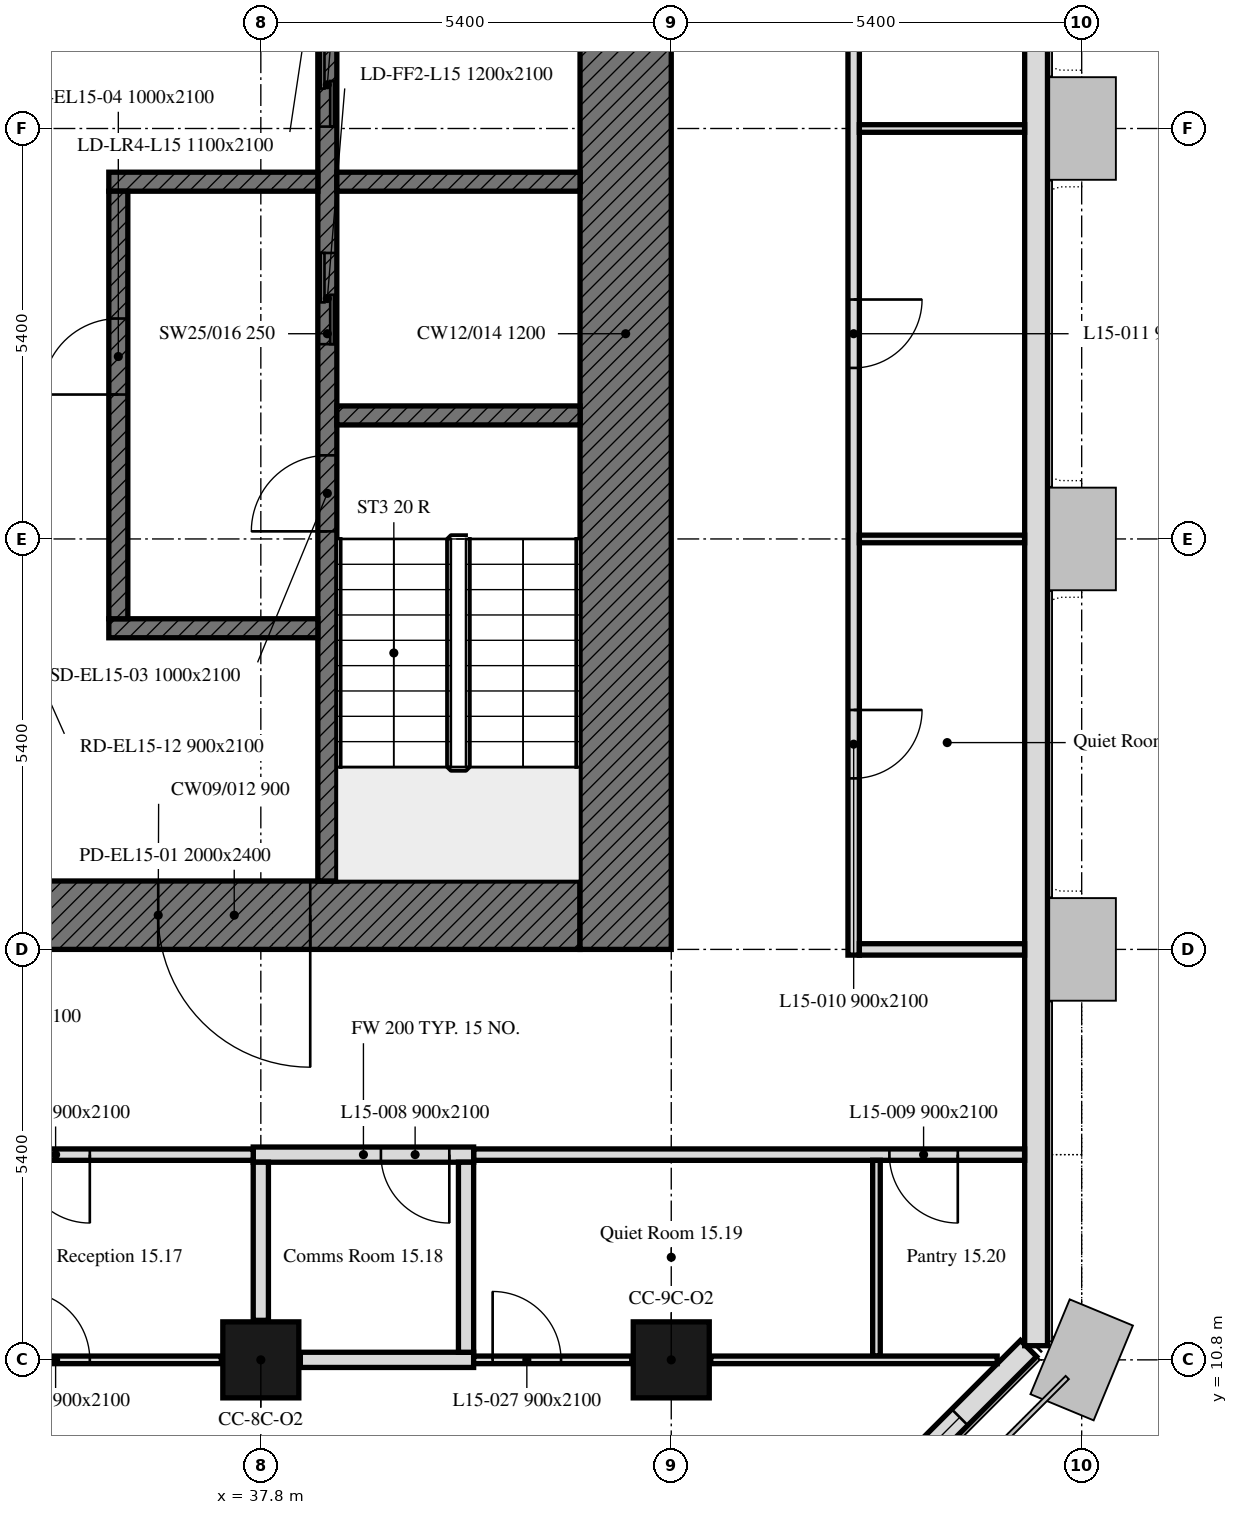
"""IFC4 building model, lengths in metres.
Left out: names, types, materials, properties, quantities, classifications, styles, units other than length and angle.
Written with IfcOpenShell. Run it as: python <this file> out.ifc"""

import sys

from ifc_helpers import new_model, si_unit, direction, frame, frame_2d, origin, origin_2d, place, context, subcontext, project, spatial, rectangle, extrude, element, fill, save


model = new_model("IFC4")
c1 = context("Model", 3, precision=1e-05, world=origin(), true_north=direction((0.0, 1.0)))
c2 = subcontext(c1, "Body", "Model", "MODEL_VIEW")
j1 = project(units=[si_unit("LENGTHUNIT", "METRE"), si_unit("PLANEANGLEUNIT", "RADIAN")], contexts=[c1])
p1 = place(None, origin())
s1 = spatial("IfcSite", under=j1, at=p1, CompositionType="ELEMENT")
p2 = place(p1, origin())
s2 = spatial("IfcBuilding", under=s1, at=p2, CompositionType="ELEMENT")
p3 = place(p2, frame((0.0, 0.0, 68.8)))
s3 = spatial("IfcBuildingStorey", under=s2, at=p3, CompositionType="ELEMENT", Elevation=68.8)
for number, where, z_axis, x_axis in (
    (1, (37.8, 10.8, 0.0), (0.0, 0.0, 1.0), (1.0, 0.0, 0.0)),
    (2, (43.2, 10.8, 0.0), (0.0, 0.0, 1.0), (1.0, 0.0, 0.0)),
):
    element("IfcColumn", number, at=place(p3, frame(where, z_axis=z_axis, x_axis=x_axis)), inside=s3, PredefinedType="COLUMN", context=c2, shape_type="SweptSolid", body=[
        extrude(rectangle(XDim=1.0, YDim=1.0, at=origin_2d()), origin(), (0.0, 0.0, 1.0), 3.5),
    ])
p4 = place(p3, frame((43.051, 6.099, 0.0), z_axis=(0.0, 0.0, 1.0), x_axis=(0.707106781187, 0.707106781187, 0.0)))
e3 = element("IfcWall", 3, at=p4, inside=s3, PredefinedType="SOLIDWALL", context=c2, shape_type="SweptSolid", body=[
    extrude(rectangle(XDim=6.86, YDim=0.3, at=frame_2d((3.43, 0.0))), origin(), (0.0, 0.0, 1.0), 3.5),
])
p5 = place(p4, frame((1.28, 0.0, 0.9)))
e4 = element("IfcOpeningElement", 4, at=p5, cuts=e3, PredefinedType="OPENING", context=c2, shape_type="SweptSolid", body=[
    extrude(rectangle(XDim=1.1, YDim=1.7, at=frame_2d((0.55, 0.85))), frame((0.0, 0.16, 0.0), z_axis=(0.0, -1.0, 0.0), x_axis=(1.0, 0.0, 0.0)), (0.0, 0.0, 1.0), 0.32),
])
p6 = place(p4, frame((4.48, 0.0, 0.9)))
e5 = element("IfcOpeningElement", 5, at=p6, cuts=e3, PredefinedType="OPENING", context=c2, shape_type="SweptSolid", body=[
    extrude(rectangle(XDim=1.1, YDim=1.7, at=frame_2d((0.55, 0.85))), frame((0.0, 0.16, 0.0), z_axis=(0.0, -1.0, 0.0), x_axis=(1.0, 0.0, 0.0)), (0.0, 0.0, 1.0), 0.32),
])
p7 = place(p3, frame((48.0, 10.986, 0.0), z_axis=(0.0, 0.0, 1.0), x_axis=(0.0, 1.0, 0.0)))
e6 = element("IfcWall", 6, at=p7, inside=s3, PredefinedType="SOLIDWALL", context=c2, shape_type="SweptSolid", body=[
    extrude(rectangle(XDim=32.027, YDim=0.3, at=frame_2d((16.014, 0.0))), origin(), (0.0, 0.0, 1.0), 3.5),
])
p8 = place(p7, frame((27.814, 0.0, 0.9)))
e7 = element("IfcOpeningElement", 7, at=p8, cuts=e6, PredefinedType="OPENING", context=c2, shape_type="SweptSolid", body=[
    extrude(rectangle(XDim=3.4, YDim=1.7, at=frame_2d((1.7, 0.85))), frame((0.0, 0.16, 0.0), z_axis=(0.0, -1.0, 0.0), x_axis=(1.0, 0.0, 0.0)), (0.0, 0.0, 1.0), 0.32),
])
p9 = place(p3, frame((42.0, 16.65, 0.0), z_axis=(0.0, 0.0, 1.0), x_axis=(-1.0, 0.0, 0.0)))
e8 = element("IfcWall", 8, at=p9, inside=s3, PredefinedType="SOLIDWALL", context=c2, shape_type="SweptSolid", body=[
    extrude(rectangle(XDim=11.1, YDim=0.9, at=frame_2d((5.55, 0.0))), origin(), (0.0, 0.0, 1.0), 3.5),
])
p10 = place(p9, frame((3.55, 0.0, 0.0)))
e9 = element("IfcOpeningElement", 9, at=p10, cuts=e8, PredefinedType="OPENING", context=c2, shape_type="SweptSolid", body=[
    extrude(rectangle(XDim=2.0, YDim=2.4, at=frame_2d((1.0, 1.2))), frame((0.0, 0.45, 0.0), z_axis=(0.0, -1.0, 0.0), x_axis=(1.0, 0.0, 0.0)), (0.0, 0.0, 1.0), 0.9),
])
p11 = place(p3, frame((42.6, 32.4, 0.0), z_axis=(0.0, 0.0, 1.0), x_axis=(0.0, -1.0, 0.0)))
e10 = element("IfcWall", 10, at=p11, inside=s3, PredefinedType="SOLIDWALL", context=c2, shape_type="SweptSolid", body=[
    extrude(rectangle(XDim=16.2, YDim=1.2, at=frame_2d((8.1, 0.0))), origin(), (0.0, 0.0, 1.0), 3.5),
])
p12 = place(p3, frame((38.675, 17.1, 0.0), z_axis=(0.0, 0.0, 1.0), x_axis=(0.0, 1.0, 0.0)))
e11 = element("IfcWall", 11, at=p12, inside=s3, PredefinedType="SOLIDWALL", context=c2, shape_type="SweptSolid", body=[
    extrude(rectangle(XDim=14.4, YDim=0.25, at=frame_2d((7.2, 0.0))), origin(), (0.0, 0.0, 1.0), 3.5),
])
p13 = place(p12, frame((4.6, 0.0, 0.0)))
e12 = element("IfcOpeningElement", 12, at=p13, cuts=e11, PredefinedType="OPENING", context=c2, shape_type="SweptSolid", body=[
    extrude(rectangle(XDim=1.0, YDim=2.1, at=frame_2d((0.5, 1.05))), frame((0.0, 0.125, 0.0), z_axis=(0.0, -1.0, 0.0), x_axis=(1.0, 0.0, 0.0)), (0.0, 0.0, 1.0), 0.25),
])
p14 = place(p12, frame((7.062, 0.0, 0.0)))
e13 = element("IfcOpeningElement", 13, at=p14, cuts=e11, PredefinedType="OPENING", context=c2, shape_type="SweptSolid", body=[
    extrude(rectangle(XDim=1.2, YDim=2.1, at=frame_2d((0.6, 1.05))), frame((0.0, 0.125, 0.0), z_axis=(0.0, -1.0, 0.0), x_axis=(1.0, 0.0, 0.0)), (0.0, 0.0, 1.0), 0.25),
])
p15 = place(p12, frame((9.925, 0.0, 0.0)))
e14 = element("IfcOpeningElement", 14, at=p15, cuts=e11, PredefinedType="OPENING", context=c2, shape_type="SweptSolid", body=[
    extrude(rectangle(XDim=1.1, YDim=2.1, at=frame_2d((0.55, 1.05))), frame((0.0, 0.125, 0.0), z_axis=(0.0, -1.0, 0.0), x_axis=(1.0, 0.0, 0.0)), (0.0, 0.0, 1.0), 0.25),
])
p16 = place(p12, frame((12.587, 0.0, 0.0)))
e15 = element("IfcOpeningElement", 15, at=p16, cuts=e11, PredefinedType="OPENING", context=c2, shape_type="SweptSolid", body=[
    extrude(rectangle(XDim=1.1, YDim=2.1, at=frame_2d((0.55, 1.05))), frame((0.0, 0.125, 0.0), z_axis=(0.0, -1.0, 0.0), x_axis=(1.0, 0.0, 0.0)), (0.0, 0.0, 1.0), 0.25),
])
for number, where, z_axis, x_axis in (
    (16, (38.8, 23.225, 0.0), (0.0, 0.0, 1.0), (1.0, 0.0, 0.0)),
    (17, (38.8, 26.3, 0.0), (0.0, 0.0, 1.0), (1.0, 0.0, 0.0)),
):
    element("IfcWall", number, at=place(p3, frame(where, z_axis=z_axis, x_axis=x_axis)), inside=s3, PredefinedType="SOLIDWALL", context=c2, shape_type="SweptSolid", body=[
        extrude(rectangle(XDim=3.2, YDim=0.25, at=frame_2d((1.6, 0.0))), origin(), (0.0, 0.0, 1.0), 3.5),
    ])
for number, where, z_axis, x_axis in (
    (18, (35.8, 26.3, 0.0), (0.0, 0.0, 1.0), (1.0, 0.0, 0.0)),
    (19, (35.8, 20.425, 0.0), (0.0, 0.0, 1.0), (1.0, 0.0, 0.0)),
):
    element("IfcWall", number, at=place(p3, frame(where, z_axis=z_axis, x_axis=x_axis)), inside=s3, PredefinedType="SOLIDWALL", context=c2, shape_type="SweptSolid", body=[
        extrude(rectangle(XDim=2.75, YDim=0.25, at=frame_2d((1.375, 0.0))), origin(), (0.0, 0.0, 1.0), 3.5),
    ])
p17 = place(p3, frame((35.925, 20.55, 0.0), z_axis=(0.0, 0.0, 1.0), x_axis=(0.0, 1.0, 0.0)))
e20 = element("IfcWall", 20, at=p17, inside=s3, PredefinedType="SOLIDWALL", context=c2, shape_type="SweptSolid", body=[
    extrude(rectangle(XDim=5.625, YDim=0.25, at=frame_2d((2.812, 0.0))), origin(), (0.0, 0.0, 1.0), 3.5),
])
p18 = place(p17, frame((2.95, 0.0, 0.0)))
e21 = element("IfcOpeningElement", 21, at=p18, cuts=e20, PredefinedType="OPENING", context=c2, shape_type="SweptSolid", body=[
    extrude(rectangle(XDim=1.0, YDim=2.1, at=frame_2d((0.5, 1.05))), frame((0.0, 0.125, 0.0), z_axis=(0.0, -1.0, 0.0), x_axis=(1.0, 0.0, 0.0)), (0.0, 0.0, 1.0), 0.25),
])
p19 = place(p3, frame((45.6, 32.325, 0.0), z_axis=(0.0, 0.0, 1.0), x_axis=(0.0, -1.0, 0.0)))
e22 = element("IfcWall", 22, at=p19, inside=s3, PredefinedType="PARTITIONING", context=c2, shape_type="SweptSolid", body=[
    extrude(rectangle(XDim=16.2, YDim=0.15, at=frame_2d((8.1, 0.0))), origin(), (0.0, 0.0, 1.0), 2.75),
])
p20 = place(p19, frame((12.975, 0.0, 0.0)))
e23 = element("IfcOpeningElement", 23, at=p20, cuts=e22, PredefinedType="OPENING", context=c2, shape_type="SweptSolid", body=[
    extrude(rectangle(XDim=0.9, YDim=2.1, at=frame_2d((0.45, 1.05))), frame((0.0, 0.075, 0.0), z_axis=(0.0, -1.0, 0.0), x_axis=(1.0, 0.0, 0.0)), (0.0, 0.0, 1.0), 0.15),
])
p21 = place(p19, frame((7.575, 0.0, 0.0)))
e24 = element("IfcOpeningElement", 24, at=p21, cuts=e22, PredefinedType="OPENING", context=c2, shape_type="SweptSolid", body=[
    extrude(rectangle(XDim=0.9, YDim=2.1, at=frame_2d((0.45, 1.05))), frame((0.0, 0.075, 0.0), z_axis=(0.0, -1.0, 0.0), x_axis=(1.0, 0.0, 0.0)), (0.0, 0.0, 1.0), 0.15),
])
p22 = place(p19, frame((2.175, 0.0, 0.0)))
e25 = element("IfcOpeningElement", 25, at=p22, cuts=e22, PredefinedType="OPENING", context=c2, shape_type="SweptSolid", body=[
    extrude(rectangle(XDim=0.9, YDim=2.1, at=frame_2d((0.45, 1.05))), frame((0.0, 0.075, 0.0), z_axis=(0.0, -1.0, 0.0), x_axis=(1.0, 0.0, 0.0)), (0.0, 0.0, 1.0), 0.15),
])
p23 = place(p3, frame((45.675, 16.2, 0.0), z_axis=(0.0, 0.0, 1.0), x_axis=(1.0, 0.0, 0.0)))
e26 = element("IfcWall", 26, at=p23, inside=s3, PredefinedType="PARTITIONING", context=c2, shape_type="SweptSolid", body=[
    extrude(rectangle(XDim=2.174, YDim=0.15, at=frame_2d((1.087, 0.0))), origin(), (0.0, 0.0, 1.0), 2.75),
])
p24 = place(p3, frame((47.849, 13.5, 0.0), z_axis=(0.0, 0.0, 1.0), x_axis=(-1.0, 0.0, 0.0)))
e27 = element("IfcWall", 27, at=p24, inside=s3, PredefinedType="PARTITIONING", context=c2, shape_type="SweptSolid", body=[
    extrude(rectangle(XDim=7.249, YDim=0.15, at=frame_2d((3.625, 0.0))), origin(), (0.0, 0.0, 1.0), 3.5),
])
p25 = place(p24, frame((0.879, 0.0, 0.0)))
e28 = element("IfcOpeningElement", 28, at=p25, cuts=e27, PredefinedType="OPENING", context=c2, shape_type="SweptSolid", body=[
    extrude(rectangle(XDim=0.9, YDim=2.1, at=frame_2d((0.45, 1.05))), frame((0.0, 0.075, 0.0), z_axis=(0.0, -1.0, 0.0), x_axis=(1.0, 0.0, 0.0)), (0.0, 0.0, 1.0), 0.15),
])
p26 = place(p3, frame((40.6, 13.5, 0.0), z_axis=(0.0, 0.0, 1.0), x_axis=(-1.0, 0.0, 0.0)))
e29 = element("IfcWall", 29, at=p26, inside=s3, PredefinedType="PARTITIONING", context=c2, shape_type="SweptSolid", body=[
    extrude(rectangle(XDim=2.9, YDim=0.2, at=frame_2d((1.45, 0.0))), origin(), (0.0, 0.0, 1.0), 3.5),
])
p27 = place(p26, frame((0.32, 0.0, 0.0)))
e30 = element("IfcOpeningElement", 30, at=p27, cuts=e29, PredefinedType="OPENING", context=c2, shape_type="SweptSolid", body=[
    extrude(rectangle(XDim=0.9, YDim=2.1, at=frame_2d((0.45, 1.05))), frame((0.0, 0.1, 0.0), z_axis=(0.0, -1.0, 0.0), x_axis=(1.0, 0.0, 0.0)), (0.0, 0.0, 1.0), 0.2),
])
p28 = place(p3, frame((37.7, 13.5, 0.0), z_axis=(0.0, 0.0, 1.0), x_axis=(-1.0, 0.0, 0.0)))
e31 = element("IfcWall", 31, at=p28, inside=s3, PredefinedType="PARTITIONING", context=c2, shape_type="SweptSolid", body=[
    extrude(rectangle(XDim=13.3, YDim=0.15, at=frame_2d((6.65, 0.0))), origin(), (0.0, 0.0, 1.0), 3.5),
])
p29 = place(p28, frame((2.15, 0.0, 0.0)))
e32 = element("IfcOpeningElement", 32, at=p29, cuts=e31, PredefinedType="OPENING", context=c2, shape_type="SweptSolid", body=[
    extrude(rectangle(XDim=0.9, YDim=2.1, at=frame_2d((0.45, 1.05))), frame((0.0, 0.075, 0.0), z_axis=(0.0, -1.0, 0.0), x_axis=(1.0, 0.0, 0.0)), (0.0, 0.0, 1.0), 0.15),
])
p30 = place(p28, frame((8.17, 0.0, 0.0)))
e33 = element("IfcOpeningElement", 33, at=p30, cuts=e31, PredefinedType="OPENING", context=c2, shape_type="SweptSolid", body=[
    extrude(rectangle(XDim=0.9, YDim=2.1, at=frame_2d((0.45, 1.05))), frame((0.0, 0.075, 0.0), z_axis=(0.0, -1.0, 0.0), x_axis=(1.0, 0.0, 0.0)), (0.0, 0.0, 1.0), 0.15),
])
p31 = place(p3, frame((32.92, 10.8, 0.0), z_axis=(0.0, 0.0, 1.0), x_axis=(1.0, 0.0, 0.0)))
e34 = element("IfcWall", 34, at=p31, inside=s3, PredefinedType="PARTITIONING", context=c2, shape_type="SweptSolid", body=[
    extrude(rectangle(XDim=4.36, YDim=0.1, at=frame_2d((2.18, 0.0))), origin(), (0.0, 0.0, 1.0), 3.5),
])
p32 = place(p31, frame((1.73, 0.0, 0.0)))
e35 = element("IfcOpeningElement", 35, at=p32, cuts=e34, PredefinedType="OPENING", context=c2, shape_type="SweptSolid", body=[
    extrude(rectangle(XDim=0.9, YDim=2.1, at=frame_2d((0.45, 1.05))), frame((0.0, 0.05, 0.0), z_axis=(0.0, -1.0, 0.0), x_axis=(1.0, 0.0, 0.0)), (0.0, 0.0, 1.0), 0.1),
])
p33 = place(p3, frame((37.8, 11.32, 0.0), z_axis=(0.0, 0.0, 1.0), x_axis=(0.0, 1.0, 0.0)))
e36 = element("IfcWall", 36, at=p33, inside=s3, PredefinedType="PARTITIONING", context=c2, shape_type="SweptSolid", body=[
    extrude(rectangle(XDim=2.08, YDim=0.2, at=frame_2d((1.04, 0.0))), origin(), (0.0, 0.0, 1.0), 3.5),
])
p34 = place(p3, frame((38.32, 10.8, 0.0), z_axis=(0.0, 0.0, 1.0), x_axis=(1.0, 0.0, 0.0)))
e37 = element("IfcWall", 37, at=p34, inside=s3, PredefinedType="PARTITIONING", context=c2, shape_type="SweptSolid", body=[
    extrude(rectangle(XDim=2.28, YDim=0.2, at=frame_2d((1.14, 0.0))), origin(), (0.0, 0.0, 1.0), 3.5),
])
p35 = place(p3, frame((40.5, 10.9, 0.0), z_axis=(0.0, 0.0, 1.0), x_axis=(0.0, 1.0, 0.0)))
e38 = element("IfcWall", 38, at=p35, inside=s3, PredefinedType="PARTITIONING", context=c2, shape_type="SweptSolid", body=[
    extrude(rectangle(XDim=2.5, YDim=0.2, at=frame_2d((1.25, 0.0))), origin(), (0.0, 0.0, 1.0), 3.5),
])
p36 = place(p3, frame((40.6, 10.8, 0.0), z_axis=(0.0, 0.0, 1.0), x_axis=(1.0, 0.0, 0.0)))
e39 = element("IfcWall", 39, at=p36, inside=s3, PredefinedType="PARTITIONING", context=c2, shape_type="SweptSolid", body=[
    extrude(rectangle(XDim=2.08, YDim=0.1, at=frame_2d((1.04, 0.0))), origin(), (0.0, 0.0, 1.0), 3.5),
])
p37 = place(p36, frame((0.25, 0.0, 0.0)))
e40 = element("IfcOpeningElement", 40, at=p37, cuts=e39, PredefinedType="OPENING", context=c2, shape_type="SweptSolid", body=[
    extrude(rectangle(XDim=0.9, YDim=2.1, at=frame_2d((0.45, 1.05))), frame((0.0, 0.05, 0.0), z_axis=(0.0, -1.0, 0.0), x_axis=(1.0, 0.0, 0.0)), (0.0, 0.0, 1.0), 0.1),
])
p38 = place(p3, frame((45.9, 10.85, 0.0), z_axis=(0.0, 0.0, 1.0), x_axis=(0.0, 1.0, 0.0)))
e41 = element("IfcWall", 41, at=p38, inside=s3, PredefinedType="PARTITIONING", context=c2, shape_type="SweptSolid", body=[
    extrude(rectangle(XDim=2.575, YDim=0.1, at=frame_2d((1.288, 0.0))), origin(), (0.0, 0.0, 1.0), 3.5),
])
p39 = place(p3, frame((43.72, 10.8, 0.0), z_axis=(0.0, 0.0, 1.0), x_axis=(1.0, 0.0, 0.0)))
e42 = element("IfcWall", 42, at=p39, inside=s3, PredefinedType="PARTITIONING", context=c2, shape_type="SweptSolid", body=[
    extrude(rectangle(XDim=3.768, YDim=0.1, at=frame_2d((1.884, 0.0))), origin(), (0.0, 0.0, 1.0), 3.5),
])
for number, where, z_axis, x_axis in (
    (43, (45.675, 21.6, 0.0), (0.0, 0.0, 1.0), (1.0, 0.0, 0.0)),
    (44, (45.675, 27.0, 0.0), (0.0, 0.0, 1.0), (1.0, 0.0, 0.0)),
):
    element("IfcWall", number, at=place(p3, frame(where, z_axis=z_axis, x_axis=x_axis)), inside=s3, PredefinedType="PARTITIONING", context=c2, shape_type="SweptSolid", body=[
        extrude(rectangle(XDim=2.174, YDim=0.1, at=frame_2d((1.087, 0.0))), origin(), (0.0, 0.0, 1.0), 2.75),
    ])
p40 = place(p6, origin())
e45 = element("IfcWindow", 45, at=p40, inside=s3, PartitioningType="SINGLE_PANEL", PredefinedType="WINDOW", context=c2, shape_type="SweptSolid", body=[
    extrude(rectangle(XDim=1.1, YDim=1.7, at=frame_2d((0.55, 0.85))), frame((0.0, 0.03, 0.0), z_axis=(0.0, -1.0, 0.0), x_axis=(1.0, 0.0, 0.0)), (0.0, 0.0, 1.0), 0.06),
])
fill(e5, e45)
p41 = place(p10, origin())
e46 = element("IfcDoor", 46, at=p41, inside=s3, OperationType="DOUBLE_DOOR_SINGLE_SWING", PredefinedType="DOOR", context=c2, shape_type="SweptSolid", body=[
    extrude(rectangle(XDim=2.0, YDim=2.4, at=frame_2d((1.0, 1.2))), frame((0.0, 0.025, 0.0), z_axis=(0.0, -1.0, 0.0), x_axis=(1.0, 0.0, 0.0)), (0.0, 0.0, 1.0), 0.05),
])
fill(e9, e46)
p42 = place(p13, origin())
e47 = element("IfcDoor", 47, at=p42, inside=s3, OperationType="SINGLE_SWING_LEFT", PredefinedType="DOOR", context=c2, shape_type="SweptSolid", body=[
    extrude(rectangle(XDim=1.0, YDim=2.1, at=frame_2d((0.5, 1.05))), frame((0.0, 0.025, 0.0), z_axis=(0.0, -1.0, 0.0), x_axis=(1.0, 0.0, 0.0)), (0.0, 0.0, 1.0), 0.05),
])
fill(e12, e47)
p43 = place(p18, origin())
e48 = element("IfcDoor", 48, at=p43, inside=s3, OperationType="SINGLE_SWING_LEFT", PredefinedType="DOOR", context=c2, shape_type="SweptSolid", body=[
    extrude(rectangle(XDim=1.0, YDim=2.1, at=frame_2d((0.5, 1.05))), frame((0.0, 0.025, 0.0), z_axis=(0.0, -1.0, 0.0), x_axis=(1.0, 0.0, 0.0)), (0.0, 0.0, 1.0), 0.05),
])
fill(e21, e48)
p44 = place(p14, origin())
e49 = element("IfcDoor", 49, at=p44, inside=s3, OperationType="DOUBLE_DOOR_SLIDING", PredefinedType="DOOR", context=c2, shape_type="SweptSolid", body=[
    extrude(rectangle(XDim=1.2, YDim=2.1, at=frame_2d((0.6, 1.05))), frame((0.0, 0.025, 0.0), z_axis=(0.0, -1.0, 0.0), x_axis=(1.0, 0.0, 0.0)), (0.0, 0.0, 1.0), 0.05),
])
fill(e13, e49)
p45 = place(p15, origin())
e50 = element("IfcDoor", 50, at=p45, inside=s3, OperationType="DOUBLE_DOOR_SLIDING", PredefinedType="DOOR", context=c2, shape_type="SweptSolid", body=[
    extrude(rectangle(XDim=1.1, YDim=2.1, at=frame_2d((0.55, 1.05))), frame((0.0, 0.025, 0.0), z_axis=(0.0, -1.0, 0.0), x_axis=(1.0, 0.0, 0.0)), (0.0, 0.0, 1.0), 0.05),
])
fill(e14, e50)
p46 = place(p27, origin())
e51 = element("IfcDoor", 51, at=p46, inside=s3, OperationType="SINGLE_SWING_RIGHT", PredefinedType="DOOR", context=c2, shape_type="SweptSolid", body=[
    extrude(rectangle(XDim=0.9, YDim=2.1, at=frame_2d((0.45, 1.05))), frame((0.0, 0.025, 0.0), z_axis=(0.0, -1.0, 0.0), x_axis=(1.0, 0.0, 0.0)), (0.0, 0.0, 1.0), 0.05),
])
fill(e30, e51)
p47 = place(p25, origin())
e52 = element("IfcDoor", 52, at=p47, inside=s3, OperationType="SINGLE_SWING_RIGHT", PredefinedType="DOOR", context=c2, shape_type="SweptSolid", body=[
    extrude(rectangle(XDim=0.9, YDim=2.1, at=frame_2d((0.45, 1.05))), frame((0.0, 0.025, 0.0), z_axis=(0.0, -1.0, 0.0), x_axis=(1.0, 0.0, 0.0)), (0.0, 0.0, 1.0), 0.05),
])
fill(e28, e52)
p48 = place(p20, origin())
e53 = element("IfcDoor", 53, at=p48, inside=s3, OperationType="SINGLE_SWING_LEFT", PredefinedType="DOOR", context=c2, shape_type="SweptSolid", body=[
    extrude(rectangle(XDim=0.9, YDim=2.1, at=frame_2d((0.45, 1.05))), frame((0.0, 0.025, 0.0), z_axis=(0.0, -1.0, 0.0), x_axis=(1.0, 0.0, 0.0)), (0.0, 0.0, 1.0), 0.05),
])
fill(e23, e53)
p49 = place(p21, origin())
e54 = element("IfcDoor", 54, at=p49, inside=s3, OperationType="SINGLE_SWING_LEFT", PredefinedType="DOOR", context=c2, shape_type="SweptSolid", body=[
    extrude(rectangle(XDim=0.9, YDim=2.1, at=frame_2d((0.45, 1.05))), frame((0.0, 0.025, 0.0), z_axis=(0.0, -1.0, 0.0), x_axis=(1.0, 0.0, 0.0)), (0.0, 0.0, 1.0), 0.05),
])
fill(e24, e54)
p50 = place(p37, origin())
e55 = element("IfcDoor", 55, at=p50, inside=s3, OperationType="SINGLE_SWING_LEFT", PredefinedType="DOOR", context=c2, shape_type="SweptSolid", body=[
    extrude(rectangle(XDim=0.9, YDim=2.1, at=frame_2d((0.45, 1.05))), frame((0.0, 0.025, 0.0), z_axis=(0.0, -1.0, 0.0), x_axis=(1.0, 0.0, 0.0)), (0.0, 0.0, 1.0), 0.05),
])
fill(e40, e55)
p51 = place(p29, origin())
e56 = element("IfcDoor", 56, at=p51, inside=s3, OperationType="SINGLE_SWING_RIGHT", PredefinedType="DOOR", context=c2, shape_type="SweptSolid", body=[
    extrude(rectangle(XDim=0.9, YDim=2.1, at=frame_2d((0.45, 1.05))), frame((0.0, 0.025, 0.0), z_axis=(0.0, -1.0, 0.0), x_axis=(1.0, 0.0, 0.0)), (0.0, 0.0, 1.0), 0.05),
])
fill(e32, e56)
p52 = place(p32, origin())
e57 = element("IfcDoor", 57, at=p52, inside=s3, OperationType="SINGLE_SWING_RIGHT", PredefinedType="DOOR", context=c2, shape_type="SweptSolid", body=[
    extrude(rectangle(XDim=0.9, YDim=2.1, at=frame_2d((0.45, 1.05))), frame((0.0, 0.025, 0.0), z_axis=(0.0, -1.0, 0.0), x_axis=(1.0, 0.0, 0.0)), (0.0, 0.0, 1.0), 0.05),
])
fill(e35, e57)
save(model, sys.argv[1])
